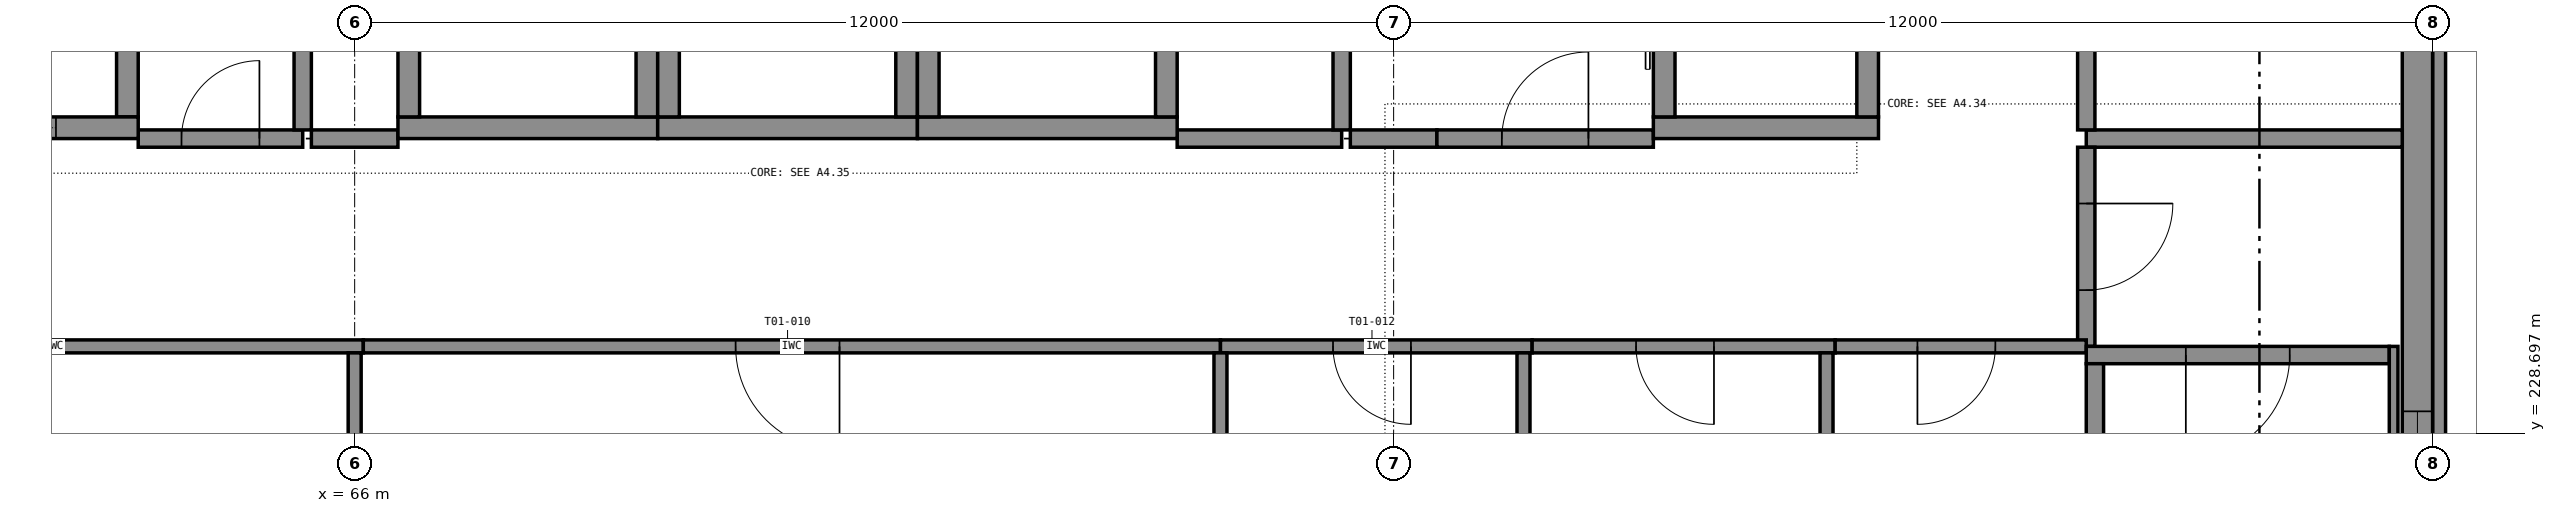
"""IFC4 building model, lengths in metres.
Left out: names, types, materials, properties, quantities, classifications, styles, units other than length and angle.
Written with IfcOpenShell. Run it as: python <this file> out.ifc"""

import sys

from ifc_helpers import new_model, si_unit, direction, frame, frame_2d, origin, place, context, subcontext, project, spatial, rectangle, extrude, element, fill, save


model = new_model("IFC4")
c1 = context("Model", 3, precision=1e-05, world=origin(), true_north=direction((0.0, 1.0)))
c2 = subcontext(c1, "Body", "Model", "MODEL_VIEW")
j1 = project(units=[si_unit("LENGTHUNIT", "METRE"), si_unit("PLANEANGLEUNIT", "RADIAN")], contexts=[c1])
p1 = place(None, origin())
s1 = spatial("IfcSite", under=j1, at=p1, CompositionType="ELEMENT")
p2 = place(p1, origin())
s2 = spatial("IfcBuilding", under=s1, at=p2, CompositionType="ELEMENT")
p3 = place(p2, frame((0.0, 0.0, 6.0)))
s3 = spatial("IfcBuildingStorey", under=s2, at=p3, CompositionType="ELEMENT", Elevation=6.0)
p4 = place(p3, frame((60.5, 232.225, 0.0), z_axis=(0.0, 0.0, 1.0), x_axis=(1.0, 0.0, 0.0)))
e1 = element("IfcWall", 1, at=p4, inside=s3, PredefinedType="SHEAR", context=c2, shape_type="SweptSolid", body=[
    extrude(rectangle(XDim=3.0, YDim=0.25, at=frame_2d((1.5, 0.0))), origin(), (0.0, 0.0, 1.0), 6.0),
])
p5 = place(p4, frame((0.95, 0.0, 0.0)))
e2 = element("IfcOpeningElement", 2, at=p5, cuts=e1, PredefinedType="OPENING", context=c2, shape_type="SweptSolid", body=[
    extrude(rectangle(XDim=1.1, YDim=2.1, at=frame_2d((0.55, 1.05))), frame((0.0, 0.135, 0.0), z_axis=(0.0, -1.0, 0.0), x_axis=(1.0, 0.0, 0.0)), (0.0, 0.0, 1.0), 0.27),
])
p6 = place(p3, frame((63.375, 232.35, 0.0), z_axis=(0.0, 0.0, 1.0), x_axis=(0.0, 1.0, 0.0)))
e3 = element("IfcWall", 3, at=p6, inside=s3, PredefinedType="SHEAR", context=c2, shape_type="SweptSolid", body=[
    extrude(rectangle(XDim=3.3, YDim=0.25, at=frame_2d((1.65, 0.0))), origin(), (0.0, 0.0, 1.0), 6.0),
])
p7 = place(p3, frame((66.5, 232.225, 0.0), z_axis=(0.0, 0.0, 1.0), x_axis=(1.0, 0.0, 0.0)))
e4 = element("IfcWall", 4, at=p7, inside=s3, PredefinedType="SHEAR", context=c2, shape_type="SweptSolid", body=[
    extrude(rectangle(XDim=3.0, YDim=0.25, at=frame_2d((1.5, 0.0))), origin(), (0.0, 0.0, 1.0), 6.0),
])
for number, where, z_axis, x_axis in (
    (5, (66.625, 232.35, 0.0), (0.0, 0.0, 1.0), (0.0, 1.0, 0.0)),
    (6, (69.375, 232.35, 0.0), (0.0, 0.0, 1.0), (0.0, 1.0, 0.0)),
):
    element("IfcWall", number, at=place(p3, frame(where, z_axis=z_axis, x_axis=x_axis)), inside=s3, PredefinedType="SHEAR", context=c2, shape_type="SweptSolid", body=[
        extrude(rectangle(XDim=3.3, YDim=0.25, at=frame_2d((1.65, 0.0))), origin(), (0.0, 0.0, 1.0), 6.0),
    ])
p8 = place(p3, frame((69.5, 232.225, 0.0), z_axis=(0.0, 0.0, 1.0), x_axis=(1.0, 0.0, 0.0)))
e7 = element("IfcWall", 7, at=p8, inside=s3, PredefinedType="SHEAR", context=c2, shape_type="SweptSolid", body=[
    extrude(rectangle(XDim=3.0, YDim=0.25, at=frame_2d((1.5, 0.0))), origin(), (0.0, 0.0, 1.0), 6.0),
])
for number, where, z_axis, x_axis in (
    (8, (69.625, 232.35, 0.0), (0.0, 0.0, 1.0), (0.0, 1.0, 0.0)),
    (9, (72.375, 232.35, 0.0), (0.0, 0.0, 1.0), (0.0, 1.0, 0.0)),
):
    element("IfcWall", number, at=place(p3, frame(where, z_axis=z_axis, x_axis=x_axis)), inside=s3, PredefinedType="SHEAR", context=c2, shape_type="SweptSolid", body=[
        extrude(rectangle(XDim=3.3, YDim=0.25, at=frame_2d((1.65, 0.0))), origin(), (0.0, 0.0, 1.0), 6.0),
    ])
p9 = place(p3, frame((72.5, 232.225, 0.0), z_axis=(0.0, 0.0, 1.0), x_axis=(1.0, 0.0, 0.0)))
e10 = element("IfcWall", 10, at=p9, inside=s3, PredefinedType="SHEAR", context=c2, shape_type="SweptSolid", body=[
    extrude(rectangle(XDim=3.0, YDim=0.25, at=frame_2d((1.5, 0.0))), origin(), (0.0, 0.0, 1.0), 6.0),
])
for number, where, z_axis, x_axis in (
    (11, (72.625, 232.35, 0.0), (0.0, 0.0, 1.0), (0.0, 1.0, 0.0)),
    (12, (75.375, 232.35, 0.0), (0.0, 0.0, 1.0), (0.0, 1.0, 0.0)),
):
    element("IfcWall", number, at=place(p3, frame(where, z_axis=z_axis, x_axis=x_axis)), inside=s3, PredefinedType="SHEAR", context=c2, shape_type="SweptSolid", body=[
        extrude(rectangle(XDim=3.3, YDim=0.25, at=frame_2d((1.65, 0.0))), origin(), (0.0, 0.0, 1.0), 6.0),
    ])
p10 = place(p3, frame((81.0, 232.225, 0.0), z_axis=(0.0, 0.0, 1.0), x_axis=(1.0, 0.0, 0.0)))
e13 = element("IfcWall", 13, at=p10, inside=s3, PredefinedType="SHEAR", context=c2, shape_type="SweptSolid", body=[
    extrude(rectangle(XDim=2.6, YDim=0.25, at=frame_2d((1.3, 0.0))), origin(), (0.0, 0.0, 1.0), 6.0),
])
p11 = place(p3, frame((81.125, 232.35, 0.0), z_axis=(0.0, 0.0, 1.0), x_axis=(0.0, 1.0, 0.0)))
e14 = element("IfcWall", 14, at=p11, inside=s3, PredefinedType="SHEAR", context=c2, shape_type="SweptSolid", body=[
    extrude(rectangle(XDim=3.3, YDim=0.25, at=frame_2d((1.65, 0.0))), origin(), (0.0, 0.0, 1.0), 6.0),
])
p12 = place(p11, frame((1.1, 0.0, 0.0)))
e15 = element("IfcOpeningElement", 15, at=p12, cuts=e14, PredefinedType="OPENING", context=c2, shape_type="SweptSolid", body=[
    extrude(rectangle(XDim=1.1, YDim=2.1, at=frame_2d((0.55, 1.05))), frame((0.0, 0.135, 0.0), z_axis=(0.0, -1.0, 0.0), x_axis=(1.0, 0.0, 0.0)), (0.0, 0.0, 1.0), 0.27),
])
p13 = place(p3, frame((83.475, 232.35, 0.0), z_axis=(0.0, 0.0, 1.0), x_axis=(0.0, 1.0, 0.0)))
e16 = element("IfcWall", 16, at=p13, inside=s3, PredefinedType="SHEAR", context=c2, shape_type="SweptSolid", body=[
    extrude(rectangle(XDim=3.3, YDim=0.25, at=frame_2d((1.65, 0.0))), origin(), (0.0, 0.0, 1.0), 6.0),
])
p14 = place(p3, frame((89.5, 229.6, 0.0), z_axis=(0.0, 0.0, 1.0), x_axis=(-1.0, 0.0, 0.0)))
e17 = element("IfcWall", 17, at=p14, inside=s3, PredefinedType="SHEAR", context=c2, shape_type="SweptSolid", body=[
    extrude(rectangle(XDim=3.5, YDim=0.2, at=frame_2d((1.75, 0.0))), origin(), (0.0, 0.0, 1.0), 6.0),
])
p15 = place(p14, frame((1.15, 0.0, 0.0)))
e18 = element("IfcOpeningElement", 18, at=p15, cuts=e17, PredefinedType="OPENING", context=c2, shape_type="SweptSolid", body=[
    extrude(rectangle(XDim=1.2, YDim=2.1, at=frame_2d((0.6, 1.05))), frame((0.0, 0.11, 0.0), z_axis=(0.0, -1.0, 0.0), x_axis=(1.0, 0.0, 0.0)), (0.0, 0.0, 1.0), 0.22),
])
p16 = place(p3, frame((86.1, 222.0, 0.0), z_axis=(0.0, 0.0, 1.0), x_axis=(0.0, 1.0, 0.0)))
e19 = element("IfcWall", 19, at=p16, inside=s3, PredefinedType="SHEAR", context=c2, shape_type="SweptSolid", body=[
    extrude(rectangle(XDim=7.5, YDim=0.2, at=frame_2d((3.75, 0.0))), origin(), (0.0, 0.0, 1.0), 6.0),
])
p17 = place(p3, frame((89.55, 229.7, 0.0), z_axis=(0.0, 0.0, 1.0), x_axis=(0.0, -1.0, 0.0)))
e20 = element("IfcWall", 20, at=p17, inside=s3, PredefinedType="SHEAR", context=c2, shape_type="SweptSolid", body=[
    extrude(rectangle(XDim=7.7, YDim=0.1, at=frame_2d((3.85, 0.0))), origin(), (0.0, 0.0, 1.0), 5.75),
])
p18 = place(p3, frame((89.825, 222.0, 0.0), z_axis=(0.0, 0.0, 1.0), x_axis=(0.0, 1.0, 0.0)))
e21 = element("IfcWall", 21, at=p18, inside=s3, PredefinedType="STANDARD", context=c2, shape_type="SweptSolid", body=[
    extrude(rectangle(XDim=11.5, YDim=0.35, at=frame_2d((5.75, 0.0))), origin(), (0.0, 0.0, 1.0), 4.75),
])
p19 = place(p18, frame((4.55, 0.0, 0.6)))
e22 = element("IfcOpeningElement", 22, at=p19, cuts=e21, PredefinedType="OPENING", context=c2, shape_type="SweptSolid", body=[
    extrude(rectangle(XDim=2.4, YDim=2.4, at=frame_2d((1.2, 1.2))), frame((0.0, 0.185, 0.0), z_axis=(0.0, -1.0, 0.0), x_axis=(1.0, 0.0, 0.0)), (0.0, 0.0, 1.0), 0.37),
])
p20 = place(p3, frame((90.075, 222.0, 5.75), z_axis=(0.0, 0.0, 1.0), x_axis=(0.0, 1.0, 0.0)))
e23 = element("IfcWall", 23, at=p20, inside=s3, PredefinedType="STANDARD", context=c2, shape_type="SweptSolid", body=[
    extrude(rectangle(XDim=11.5, YDim=0.15, at=frame_2d((5.75, 0.0))), origin(), (0.0, 0.0, 1.0), 0.25),
])
p21 = place(p3, frame((63.5, 232.1, 0.0), z_axis=(0.0, 0.0, 1.0), x_axis=(1.0, 0.0, 0.0)))
e24 = element("IfcWall", 24, at=p21, inside=s3, PredefinedType="PARTITIONING", context=c2, shape_type="SweptSolid", body=[
    extrude(rectangle(XDim=1.9, YDim=0.2, at=frame_2d((0.95, 0.0))), origin(), (0.0, 0.0, 1.0), 5.75),
])
p22 = place(p21, frame((0.5, 0.0, 0.0)))
e25 = element("IfcOpeningElement", 25, at=p22, cuts=e24, PredefinedType="OPENING", context=c2, shape_type="SweptSolid", body=[
    extrude(rectangle(XDim=0.9, YDim=2.1, at=frame_2d((0.45, 1.05))), frame((0.0, 0.11, 0.0), z_axis=(0.0, -1.0, 0.0), x_axis=(1.0, 0.0, 0.0)), (0.0, 0.0, 1.0), 0.22),
])
p23 = place(p3, frame((65.5, 232.1, 0.0), z_axis=(0.0, 0.0, 1.0), x_axis=(1.0, 0.0, 0.0)))
e26 = element("IfcWall", 26, at=p23, inside=s3, PredefinedType="PARTITIONING", context=c2, shape_type="SweptSolid", body=[
    extrude(rectangle(XDim=1.0, YDim=0.2, at=frame_2d((0.5, 0.0))), origin(), (0.0, 0.0, 1.0), 5.75),
])
p24 = place(p3, frame((75.5, 232.1, 0.0), z_axis=(0.0, 0.0, 1.0), x_axis=(1.0, 0.0, 0.0)))
e27 = element("IfcWall", 27, at=p24, inside=s3, PredefinedType="PARTITIONING", context=c2, shape_type="SweptSolid", body=[
    extrude(rectangle(XDim=1.9, YDim=0.2, at=frame_2d((0.95, 0.0))), origin(), (0.0, 0.0, 1.0), 5.75),
])
p25 = place(p3, frame((77.5, 232.1, 0.0), z_axis=(0.0, 0.0, 1.0), x_axis=(1.0, 0.0, 0.0)))
e28 = element("IfcWall", 28, at=p25, inside=s3, PredefinedType="PARTITIONING", context=c2, shape_type="SweptSolid", body=[
    extrude(rectangle(XDim=1.0, YDim=0.2, at=frame_2d((0.5, 0.0))), origin(), (0.0, 0.0, 1.0), 5.75),
])
p26 = place(p3, frame((78.5, 232.1, 0.0), z_axis=(0.0, 0.0, 1.0), x_axis=(1.0, 0.0, 0.0)))
e29 = element("IfcWall", 29, at=p26, inside=s3, PredefinedType="PARTITIONING", context=c2, shape_type="SweptSolid", body=[
    extrude(rectangle(XDim=2.5, YDim=0.2, at=frame_2d((1.25, 0.0))), origin(), (0.0, 0.0, 1.0), 5.75),
])
p27 = place(p26, frame((0.75, 0.0, 0.0)))
e30 = element("IfcOpeningElement", 30, at=p27, cuts=e29, PredefinedType="OPENING", context=c2, shape_type="SweptSolid", body=[
    extrude(rectangle(XDim=1.0, YDim=2.1, at=frame_2d((0.5, 1.05))), frame((0.0, 0.11, 0.0), z_axis=(0.0, -1.0, 0.0), x_axis=(1.0, 0.0, 0.0)), (0.0, 0.0, 1.0), 0.22),
])
p28 = place(p3, frame((86.0, 232.1, 0.0), z_axis=(0.0, 0.0, 1.0), x_axis=(1.0, 0.0, 0.0)))
e31 = element("IfcWall", 31, at=p28, inside=s3, PredefinedType="PARTITIONING", context=c2, shape_type="SweptSolid", body=[
    extrude(rectangle(XDim=3.65, YDim=0.2, at=frame_2d((1.825, 0.0))), origin(), (0.0, 0.0, 1.0), 5.75),
])
for number, where, z_axis, x_axis in (
    (32, (65.4, 232.2, 0.0), (0.0, 0.0, 1.0), (0.0, 1.0, 0.0)),
    (33, (77.4, 232.2, 0.0), (0.0, 0.0, 1.0), (0.0, 1.0, 0.0)),
):
    element("IfcWall", number, at=place(p3, frame(where, z_axis=z_axis, x_axis=x_axis)), inside=s3, PredefinedType="PARTITIONING", context=c2, shape_type="SweptSolid", body=[
        extrude(rectangle(XDim=3.6, YDim=0.2, at=frame_2d((1.8, 0.0))), origin(), (0.0, 0.0, 1.0), 5.75),
    ])
p29 = place(p3, frame((86.0, 235.8, 0.0), z_axis=(0.0, 0.0, 1.0), x_axis=(0.0, -1.0, 0.0)))
e34 = element("IfcWall", 34, at=p29, inside=s3, PredefinedType="PARTITIONING", context=c2, shape_type="SweptSolid", body=[
    extrude(rectangle(XDim=3.6, YDim=0.2, at=frame_2d((1.8, 0.0))), origin(), (0.0, 0.0, 1.0), 5.75),
])
p30 = place(p29, frame((1.35, 0.0, 0.0)))
e35 = element("IfcOpeningElement", 35, at=p30, cuts=e34, PredefinedType="OPENING", context=c2, shape_type="SweptSolid", body=[
    extrude(rectangle(XDim=0.9, YDim=2.1, at=frame_2d((0.45, 1.05))), frame((0.0, 0.11, 0.0), z_axis=(0.0, -1.0, 0.0), x_axis=(1.0, 0.0, 0.0)), (0.0, 0.0, 1.0), 0.22),
])
p31 = place(p3, frame((86.0, 232.0, 0.0), z_axis=(0.0, 0.0, 1.0), x_axis=(0.0, -1.0, 0.0)))
e36 = element("IfcWall", 36, at=p31, inside=s3, PredefinedType="PARTITIONING", context=c2, shape_type="SweptSolid", body=[
    extrude(rectangle(XDim=2.3, YDim=0.2, at=frame_2d((1.15, 0.0))), origin(), (0.0, 0.0, 1.0), 5.75),
])
p32 = place(p31, frame((0.65, 0.0, 0.0)))
e37 = element("IfcOpeningElement", 37, at=p32, cuts=e36, PredefinedType="OPENING", context=c2, shape_type="SweptSolid", body=[
    extrude(rectangle(XDim=1.0, YDim=2.1, at=frame_2d((0.5, 1.05))), frame((0.0, 0.11, 0.0), z_axis=(0.0, -1.0, 0.0), x_axis=(1.0, 0.0, 0.0)), (0.0, 0.0, 1.0), 0.22),
])
p33 = place(p3, frame((66.1, 229.7, 0.0), z_axis=(0.0, 0.0, 1.0), x_axis=(-1.0, 0.0, 0.0)))
e38 = element("IfcWall", 38, at=p33, inside=s3, PredefinedType="PARTITIONING", context=c2, shape_type="SweptSolid", body=[
    extrude(rectangle(XDim=23.7, YDim=0.15, at=frame_2d((11.85, 0.0))), origin(), (0.0, 0.0, 1.0), 5.75),
])
p34 = place(p33, frame((15.6, 0.0, 0.0)))
e39 = element("IfcOpeningElement", 39, at=p34, cuts=e38, PredefinedType="OPENING", context=c2, shape_type="SweptSolid", body=[
    extrude(rectangle(XDim=1.0, YDim=2.1, at=frame_2d((0.5, 1.05))), frame((0.0, 0.085, 0.0), z_axis=(0.0, -1.0, 0.0), x_axis=(1.0, 0.0, 0.0)), (0.0, 0.0, 1.0), 0.17),
])
p35 = place(p33, frame((6.6, 0.0, 0.0)))
e40 = element("IfcOpeningElement", 40, at=p35, cuts=e38, PredefinedType="OPENING", context=c2, shape_type="SweptSolid", body=[
    extrude(rectangle(XDim=1.0, YDim=2.1, at=frame_2d((0.5, 1.05))), frame((0.0, 0.085, 0.0), z_axis=(0.0, -1.0, 0.0), x_axis=(1.0, 0.0, 0.0)), (0.0, 0.0, 1.0), 0.17),
])
p36 = place(p3, frame((76.0, 229.7, 0.0), z_axis=(0.0, 0.0, 1.0), x_axis=(-1.0, 0.0, 0.0)))
e41 = element("IfcWall", 41, at=p36, inside=s3, PredefinedType="PARTITIONING", context=c2, shape_type="SweptSolid", body=[
    extrude(rectangle(XDim=9.9, YDim=0.15, at=frame_2d((4.95, 0.0))), origin(), (0.0, 0.0, 1.0), 5.75),
])
p37 = place(p36, frame((4.4, 0.0, 0.0)))
e42 = element("IfcOpeningElement", 42, at=p37, cuts=e41, PredefinedType="OPENING", context=c2, shape_type="SweptSolid", body=[
    extrude(rectangle(XDim=1.2, YDim=2.1, at=frame_2d((0.6, 1.05))), frame((0.0, 0.085, 0.0), z_axis=(0.0, -1.0, 0.0), x_axis=(1.0, 0.0, 0.0)), (0.0, 0.0, 1.0), 0.17),
])
p38 = place(p3, frame((66.0, 229.625, 0.0), z_axis=(0.0, 0.0, 1.0), x_axis=(0.0, -1.0, 0.0)))
e43 = element("IfcWall", 43, at=p38, inside=s3, PredefinedType="PARTITIONING", context=c2, shape_type="SweptSolid", body=[
    extrude(rectangle(XDim=7.125, YDim=0.15, at=frame_2d((3.562, 0.0))), origin(), (0.0, 0.0, 1.0), 4.75),
])
p39 = place(p38, frame((3.525, 0.0, 0.0)))
e44 = element("IfcOpeningElement", 44, at=p39, cuts=e43, PredefinedType="OPENING", context=c2, shape_type="SweptSolid", body=[
    extrude(rectangle(XDim=1.2, YDim=2.1, at=frame_2d((0.6, 1.05))), frame((0.0, 0.085, 0.0), z_axis=(0.0, -1.0, 0.0), x_axis=(1.0, 0.0, 0.0)), (0.0, 0.0, 1.0), 0.17),
])
p40 = place(p3, frame((79.6, 229.7, 0.0), z_axis=(0.0, 0.0, 1.0), x_axis=(-1.0, 0.0, 0.0)))
e45 = element("IfcWall", 45, at=p40, inside=s3, PredefinedType="PARTITIONING", context=c2, shape_type="SweptSolid", body=[
    extrude(rectangle(XDim=3.6, YDim=0.15, at=frame_2d((1.8, 0.0))), origin(), (0.0, 0.0, 1.0), 5.75),
])
p41 = place(p40, frame((1.4, 0.0, 0.0)))
e46 = element("IfcOpeningElement", 46, at=p41, cuts=e45, PredefinedType="OPENING", context=c2, shape_type="SweptSolid", body=[
    extrude(rectangle(XDim=0.9, YDim=2.1, at=frame_2d((0.45, 1.05))), frame((0.0, 0.085, 0.0), z_axis=(0.0, -1.0, 0.0), x_axis=(1.0, 0.0, 0.0)), (0.0, 0.0, 1.0), 0.17),
])
p42 = place(p3, frame((76.0, 222.4, 0.0), z_axis=(0.0, 0.0, 1.0), x_axis=(0.0, 1.0, 0.0)))
e47 = element("IfcWall", 47, at=p42, inside=s3, PredefinedType="PARTITIONING", context=c2, shape_type="SweptSolid", body=[
    extrude(rectangle(XDim=7.225, YDim=0.15, at=frame_2d((3.613, 0.0))), origin(), (0.0, 0.0, 1.0), 5.75),
])
p43 = place(p3, frame((83.1, 229.7, 0.0), z_axis=(0.0, 0.0, 1.0), x_axis=(-1.0, 0.0, 0.0)))
e48 = element("IfcWall", 48, at=p43, inside=s3, PredefinedType="PARTITIONING", context=c2, shape_type="SweptSolid", body=[
    extrude(rectangle(XDim=3.5, YDim=0.15, at=frame_2d((1.75, 0.0))), origin(), (0.0, 0.0, 1.0), 5.75),
])
p44 = place(p43, frame((1.4, 0.0, 0.0)))
e49 = element("IfcOpeningElement", 49, at=p44, cuts=e48, PredefinedType="OPENING", context=c2, shape_type="SweptSolid", body=[
    extrude(rectangle(XDim=0.9, YDim=2.1, at=frame_2d((0.45, 1.05))), frame((0.0, 0.085, 0.0), z_axis=(0.0, -1.0, 0.0), x_axis=(1.0, 0.0, 0.0)), (0.0, 0.0, 1.0), 0.17),
])
p45 = place(p3, frame((79.5, 222.4, 0.0), z_axis=(0.0, 0.0, 1.0), x_axis=(0.0, 1.0, 0.0)))
e50 = element("IfcWall", 50, at=p45, inside=s3, PredefinedType="PARTITIONING", context=c2, shape_type="SweptSolid", body=[
    extrude(rectangle(XDim=7.225, YDim=0.15, at=frame_2d((3.613, 0.0))), origin(), (0.0, 0.0, 1.0), 5.75),
])
p46 = place(p3, frame((86.0, 229.7, 0.0), z_axis=(0.0, 0.0, 1.0), x_axis=(-1.0, 0.0, 0.0)))
e51 = element("IfcWall", 51, at=p46, inside=s3, PredefinedType="PARTITIONING", context=c2, shape_type="SweptSolid", body=[
    extrude(rectangle(XDim=2.9, YDim=0.15, at=frame_2d((1.45, 0.0))), origin(), (0.0, 0.0, 1.0), 5.75),
])
p47 = place(p46, frame((1.05, 0.0, 0.0)))
e52 = element("IfcOpeningElement", 52, at=p47, cuts=e51, PredefinedType="OPENING", context=c2, shape_type="SweptSolid", body=[
    extrude(rectangle(XDim=0.9, YDim=2.1, at=frame_2d((0.45, 1.05))), frame((0.0, 0.085, 0.0), z_axis=(0.0, -1.0, 0.0), x_axis=(1.0, 0.0, 0.0)), (0.0, 0.0, 1.0), 0.17),
])
p48 = place(p3, frame((83.0, 222.4, 0.0), z_axis=(0.0, 0.0, 1.0), x_axis=(0.0, 1.0, 0.0)))
e53 = element("IfcWall", 53, at=p48, inside=s3, PredefinedType="PARTITIONING", context=c2, shape_type="SweptSolid", body=[
    extrude(rectangle(XDim=7.225, YDim=0.15, at=frame_2d((3.613, 0.0))), origin(), (0.0, 0.0, 1.0), 5.75),
])
p49 = place(p19, origin())
e54 = element("IfcWindow", 54, at=p49, inside=s3, PartitioningType="SINGLE_PANEL", PredefinedType="WINDOW", context=c2, shape_type="SweptSolid", body=[
    extrude(rectangle(XDim=2.4, YDim=2.4, at=frame_2d((1.2, 1.2))), frame((0.0, 0.03, 0.0), z_axis=(0.0, -1.0, 0.0), x_axis=(1.0, 0.0, 0.0)), (0.0, 0.0, 1.0), 0.06),
])
fill(e22, e54)
p50 = place(p22, origin())
e55 = element("IfcDoor", 55, at=p50, inside=s3, OperationType="SINGLE_SWING_RIGHT", PredefinedType="DOOR", context=c2, shape_type="SweptSolid", body=[
    extrude(rectangle(XDim=0.9, YDim=2.1, at=frame_2d((0.45, 1.05))), frame((0.0, 0.025, 0.0), z_axis=(0.0, -1.0, 0.0), x_axis=(1.0, 0.0, 0.0)), (0.0, 0.0, 1.0), 0.05),
])
fill(e25, e55)
p51 = place(p27, origin())
e56 = element("IfcDoor", 56, at=p51, inside=s3, OperationType="SINGLE_SWING_RIGHT", PredefinedType="DOOR", context=c2, shape_type="SweptSolid", body=[
    extrude(rectangle(XDim=1.0, YDim=2.1, at=frame_2d((0.5, 1.05))), frame((0.0, 0.025, 0.0), z_axis=(0.0, -1.0, 0.0), x_axis=(1.0, 0.0, 0.0)), (0.0, 0.0, 1.0), 0.05),
])
fill(e30, e56)
p52 = place(p32, origin())
e57 = element("IfcDoor", 57, at=p52, inside=s3, OperationType="SINGLE_SWING_LEFT", PredefinedType="DOOR", context=c2, shape_type="SweptSolid", body=[
    extrude(rectangle(XDim=1.0, YDim=2.1, at=frame_2d((0.5, 1.05))), frame((0.0, 0.025, 0.0), z_axis=(0.0, -1.0, 0.0), x_axis=(1.0, 0.0, 0.0)), (0.0, 0.0, 1.0), 0.05),
])
fill(e37, e57)
p53 = place(p37, origin())
e58 = element("IfcDoor", 58, at=p53, inside=s3, OperationType="SINGLE_SWING_LEFT", PredefinedType="DOOR", context=c2, shape_type="SweptSolid", body=[
    extrude(rectangle(XDim=1.2, YDim=2.1, at=frame_2d((0.6, 1.05))), frame((0.0, 0.025, 0.0), z_axis=(0.0, -1.0, 0.0), x_axis=(1.0, 0.0, 0.0)), (0.0, 0.0, 1.0), 0.05),
])
fill(e42, e58)
p54 = place(p41, origin())
e59 = element("IfcDoor", 59, at=p54, inside=s3, OperationType="SINGLE_SWING_LEFT", PredefinedType="DOOR", context=c2, shape_type="SweptSolid", body=[
    extrude(rectangle(XDim=0.9, YDim=2.1, at=frame_2d((0.45, 1.05))), frame((0.0, 0.025, 0.0), z_axis=(0.0, -1.0, 0.0), x_axis=(1.0, 0.0, 0.0)), (0.0, 0.0, 1.0), 0.05),
])
fill(e46, e59)
p55 = place(p44, origin())
e60 = element("IfcDoor", 60, at=p55, inside=s3, OperationType="SINGLE_SWING_LEFT", PredefinedType="DOOR", context=c2, shape_type="SweptSolid", body=[
    extrude(rectangle(XDim=0.9, YDim=2.1, at=frame_2d((0.45, 1.05))), frame((0.0, 0.025, 0.0), z_axis=(0.0, -1.0, 0.0), x_axis=(1.0, 0.0, 0.0)), (0.0, 0.0, 1.0), 0.05),
])
fill(e49, e60)
p56 = place(p47, origin())
e61 = element("IfcDoor", 61, at=p56, inside=s3, OperationType="SINGLE_SWING_RIGHT", PredefinedType="DOOR", context=c2, shape_type="SweptSolid", body=[
    extrude(rectangle(XDim=0.9, YDim=2.1, at=frame_2d((0.45, 1.05))), frame((0.0, 0.025, 0.0), z_axis=(0.0, -1.0, 0.0), x_axis=(1.0, 0.0, 0.0)), (0.0, 0.0, 1.0), 0.05),
])
fill(e52, e61)
p57 = place(p5, origin())
e62 = element("IfcDoor", 62, at=p57, inside=s3, OperationType="SLIDING_TO_LEFT", PredefinedType="DOOR", context=c2, shape_type="SweptSolid", body=[
    extrude(rectangle(XDim=1.1, YDim=2.1, at=frame_2d((0.55, 1.05))), frame((0.0, 0.025, 0.0), z_axis=(0.0, -1.0, 0.0), x_axis=(1.0, 0.0, 0.0)), (0.0, 0.0, 1.0), 0.05),
])
fill(e2, e62)
p58 = place(p15, origin())
e63 = element("IfcDoor", 63, at=p58, inside=s3, OperationType="SINGLE_SWING_RIGHT", PredefinedType="DOOR", context=c2, shape_type="SweptSolid", body=[
    extrude(rectangle(XDim=1.2, YDim=2.1, at=frame_2d((0.6, 1.05))), frame((0.0, 0.025, 0.0), z_axis=(0.0, -1.0, 0.0), x_axis=(1.0, 0.0, 0.0)), (0.0, 0.0, 1.0), 0.05),
])
fill(e18, e63)
save(model, sys.argv[1])
